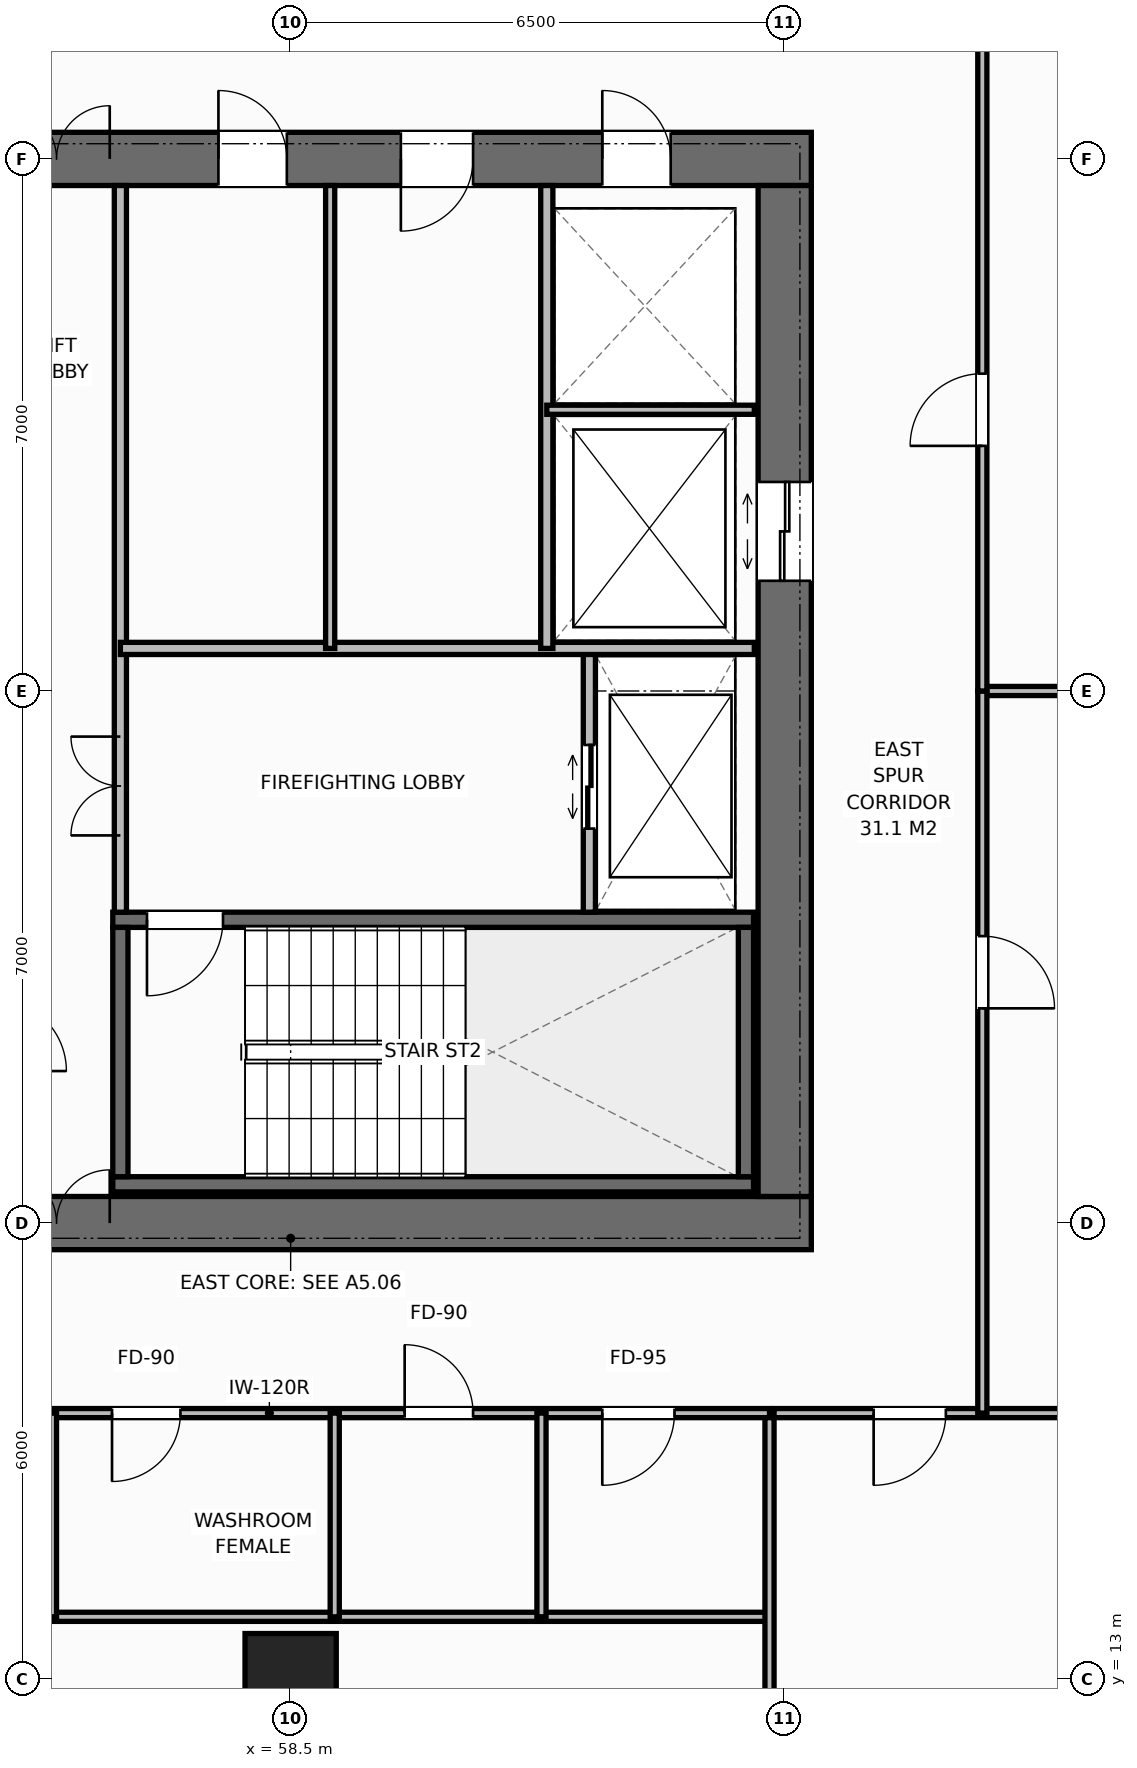
"""IFC4 building model, lengths in metres.
Left out: names, types, materials, properties, quantities, classifications, styles, units other than length and angle.
Written with IfcOpenShell. Run it as: python <this file> out.ifc"""

import sys

from ifc_helpers import new_model, si_unit, direction, frame, frame_2d, origin, origin_2d, place, context, subcontext, project, spatial, rectangle, extrude, element, fill, save


model = new_model("IFC4")
c1 = context("Model", 3, precision=1e-05, world=origin(), true_north=direction((0.0, 1.0)))
c2 = subcontext(c1, "Body", "Model", "MODEL_VIEW")
j1 = project(units=[si_unit("LENGTHUNIT", "METRE"), si_unit("PLANEANGLEUNIT", "RADIAN")], contexts=[c1])
p1 = place(None, origin())
s1 = spatial("IfcSite", under=j1, at=p1, CompositionType="ELEMENT")
p2 = place(p1, origin())
s2 = spatial("IfcBuilding", under=s1, at=p2, CompositionType="ELEMENT")
p3 = place(p2, frame((0.0, 0.0, 101.2)))
s3 = spatial("IfcBuildingStorey", under=s2, at=p3, CompositionType="ELEMENT", Elevation=101.2)
p4 = place(p3, frame((51.65, 19.0, 0.0), z_axis=(0.0, 0.0, 1.0), x_axis=(1.0, 0.0, 0.0)))
e1 = element("IfcWall", 1, at=p4, inside=s3, PredefinedType="SHEAR", context=c2, shape_type="SweptSolid", body=[
    extrude(rectangle(XDim=13.7, YDim=0.7, at=frame_2d((6.85, 0.0))), origin(), (0.0, 0.0, 1.0), 3.8),
])
p5 = place(p4, frame((3.07, 0.0, 0.0)))
e2 = element("IfcOpeningElement", 2, at=p5, cuts=e1, PredefinedType="OPENING", context=c2, shape_type="SweptSolid", body=[
    extrude(rectangle(XDim=1.4, YDim=2.2, at=frame_2d((0.7, 1.1))), frame((0.0, 0.36, 0.0), z_axis=(0.0, -1.0, 0.0), x_axis=(1.0, 0.0, 0.0)), (0.0, 0.0, 1.0), 0.72),
])
p6 = place(p3, frame((51.65, 33.0, 0.0), z_axis=(0.0, 0.0, 1.0), x_axis=(1.0, 0.0, 0.0)))
e3 = element("IfcWall", 3, at=p6, inside=s3, PredefinedType="SHEAR", context=c2, shape_type="SweptSolid", body=[
    extrude(rectangle(XDim=13.7, YDim=0.7, at=frame_2d((6.85, 0.0))), origin(), (0.0, 0.0, 1.0), 3.8),
])
p7 = place(p6, frame((3.07, 0.0, 0.0)))
e4 = element("IfcOpeningElement", 4, at=p7, cuts=e3, PredefinedType="OPENING", context=c2, shape_type="SweptSolid", body=[
    extrude(rectangle(XDim=1.4, YDim=2.2, at=frame_2d((0.7, 1.1))), frame((0.0, 0.36, 0.0), z_axis=(0.0, -1.0, 0.0), x_axis=(1.0, 0.0, 0.0)), (0.0, 0.0, 1.0), 0.72),
])
p8 = place(p6, frame((10.95, 0.0, 0.0)))
e5 = element("IfcOpeningElement", 5, at=p8, cuts=e3, PredefinedType="OPENING", context=c2, shape_type="SweptSolid", body=[
    extrude(rectangle(XDim=0.9, YDim=2.15, at=frame_2d((0.45, 1.075))), frame((0.0, 0.36, 0.0), z_axis=(0.0, -1.0, 0.0), x_axis=(1.0, 0.0, 0.0)), (0.0, 0.0, 1.0), 0.72),
])
p9 = place(p6, frame((5.9, 0.0, 0.0)))
e6 = element("IfcOpeningElement", 6, at=p9, cuts=e3, PredefinedType="OPENING", context=c2, shape_type="SweptSolid", body=[
    extrude(rectangle(XDim=0.9, YDim=2.15, at=frame_2d((0.45, 1.075))), frame((0.0, 0.36, 0.0), z_axis=(0.0, -1.0, 0.0), x_axis=(1.0, 0.0, 0.0)), (0.0, 0.0, 1.0), 0.72),
])
p10 = place(p6, frame((8.3, 0.0, 0.0)))
e7 = element("IfcOpeningElement", 7, at=p10, cuts=e3, PredefinedType="OPENING", context=c2, shape_type="SweptSolid", body=[
    extrude(rectangle(XDim=0.95, YDim=2.15, at=frame_2d((0.475, 1.075))), frame((0.0, 0.36, 0.0), z_axis=(0.0, -1.0, 0.0), x_axis=(1.0, 0.0, 0.0)), (0.0, 0.0, 1.0), 0.72),
])
p11 = place(p3, frame((65.0, 19.35, 0.0), z_axis=(0.0, 0.0, 1.0), x_axis=(0.0, 1.0, 0.0)))
e8 = element("IfcWall", 8, at=p11, inside=s3, PredefinedType="SHEAR", context=c2, shape_type="SweptSolid", body=[
    extrude(rectangle(XDim=13.3, YDim=0.7, at=frame_2d((6.65, 0.0))), origin(), (0.0, 0.0, 1.0), 3.8),
])
p12 = place(p11, frame((8.1, 0.0, 0.0)))
e9 = element("IfcOpeningElement", 9, at=p12, cuts=e8, PredefinedType="OPENING", context=c2, shape_type="SweptSolid", body=[
    extrude(rectangle(XDim=1.3, YDim=2.2, at=frame_2d((0.65, 1.1))), frame((0.0, 0.36, 0.0), z_axis=(0.0, -1.0, 0.0), x_axis=(1.0, 0.0, 0.0)), (0.0, 0.0, 1.0), 0.72),
])
p13 = place(p3, frame((56.16, 19.51, 0.0), z_axis=(0.0, 0.0, 1.0), x_axis=(1.0, 0.0, 0.0)))
e10 = element("IfcWall", 10, at=p13, inside=s3, PredefinedType="SHEAR", context=c2, shape_type="SweptSolid", body=[
    extrude(rectangle(XDim=8.43, YDim=0.2, at=frame_2d((4.215, 0.0))), origin(), (0.0, 0.0, 1.0), 3.8),
])
p14 = place(p3, frame((56.16, 22.99, 0.0), z_axis=(0.0, 0.0, 1.0), x_axis=(1.0, 0.0, 0.0)))
e11 = element("IfcWall", 11, at=p14, inside=s3, PredefinedType="SHEAR", context=c2, shape_type="SweptSolid", body=[
    extrude(rectangle(XDim=8.43, YDim=0.2, at=frame_2d((4.215, 0.0))), origin(), (0.0, 0.0, 1.0), 3.8),
])
p15 = place(p14, frame((0.45, 0.0, 0.0)))
e12 = element("IfcOpeningElement", 12, at=p15, cuts=e11, PredefinedType="OPENING", context=c2, shape_type="SweptSolid", body=[
    extrude(rectangle(XDim=1.0, YDim=2.15, at=frame_2d((0.5, 1.075))), frame((0.0, 0.11, 0.0), z_axis=(0.0, -1.0, 0.0), x_axis=(1.0, 0.0, 0.0)), (0.0, 0.0, 1.0), 0.22),
])
for number, where, z_axis, x_axis in (
    (13, (56.26, 19.61, 0.0), (0.0, 0.0, 1.0), (0.0, 1.0, 0.0)),
    (14, (64.49, 19.61, 0.0), (0.0, 0.0, 1.0), (0.0, 1.0, 0.0)),
):
    element("IfcWall", number, at=place(p3, frame(where, z_axis=z_axis, x_axis=x_axis)), inside=s3, PredefinedType="SHEAR", context=c2, shape_type="SweptSolid", body=[
        extrude(rectangle(XDim=3.28, YDim=0.2, at=frame_2d((1.64, 0.0))), origin(), (0.0, 0.0, 1.0), 3.8),
    ])
p16 = place(p3, frame((58.5, 13.0, 0.0), z_axis=(0.0, 0.0, 1.0), x_axis=(1.0, 0.0, 0.0)))
e15 = element("IfcColumn", 15, at=p16, inside=s3, PredefinedType="COLUMN", context=c2, shape_type="SweptSolid", body=[
    extrude(rectangle(XDim=1.2, YDim=1.2, at=origin_2d()), origin(), (0.0, 0.0, 1.0), 3.8),
])
p17 = place(p3, frame((56.26, 23.09, 0.0), z_axis=(0.0, 0.0, 1.0), x_axis=(0.0, 1.0, 0.0)))
e16 = element("IfcWall", 16, at=p17, inside=s3, PredefinedType="STANDARD", context=c2, shape_type="SweptSolid", body=[
    extrude(rectangle(XDim=9.56, YDim=0.16, at=frame_2d((4.78, 0.0))), origin(), (0.0, 0.0, 1.0), 3.565),
])
p18 = place(p17, frame((1.01, 0.0, 0.0)))
e17 = element("IfcOpeningElement", 17, at=p18, cuts=e16, PredefinedType="OPENING", context=c2, shape_type="SweptSolid", body=[
    extrude(rectangle(XDim=1.3, YDim=2.2, at=frame_2d((0.65, 1.1))), frame((0.0, 0.09, 0.0), z_axis=(0.0, -1.0, 0.0), x_axis=(1.0, 0.0, 0.0)), (0.0, 0.0, 1.0), 0.18),
])
p19 = place(p3, frame((62.43, 23.09, 0.0), z_axis=(0.0, 0.0, 1.0), x_axis=(0.0, 1.0, 0.0)))
e18 = element("IfcWall", 18, at=p19, inside=s3, PredefinedType="STANDARD", context=c2, shape_type="SweptSolid", body=[
    extrude(rectangle(XDim=3.47, YDim=0.16, at=frame_2d((1.735, 0.0))), origin(), (0.0, 0.0, 1.0), 3.565),
])
p20 = place(p19, frame((1.1, 0.0, 0.0)))
e19 = element("IfcOpeningElement", 19, at=p20, cuts=e18, PredefinedType="OPENING", context=c2, shape_type="SweptSolid", body=[
    extrude(rectangle(XDim=1.1, YDim=2.2, at=frame_2d((0.55, 1.1))), frame((0.0, 0.09, 0.0), z_axis=(0.0, -1.0, 0.0), x_axis=(1.0, 0.0, 0.0)), (0.0, 0.0, 1.0), 0.18),
])
p21 = place(p3, frame((56.26, 26.56, 0.0), z_axis=(0.0, 0.0, 1.0), x_axis=(1.0, 0.0, 0.0)))
e20 = element("IfcWall", 20, at=p21, inside=s3, PredefinedType="STANDARD", context=c2, shape_type="SweptSolid", body=[
    extrude(rectangle(XDim=8.34, YDim=0.16, at=frame_2d((4.17, 0.0))), origin(), (0.0, 0.0, 1.0), 3.565),
])
p22 = place(p3, frame((61.87, 26.56, 0.0), z_axis=(0.0, 0.0, 1.0), x_axis=(0.0, 1.0, 0.0)))
e21 = element("IfcWall", 21, at=p22, inside=s3, PredefinedType="STANDARD", context=c2, shape_type="SweptSolid", body=[
    extrude(rectangle(XDim=6.09, YDim=0.16, at=frame_2d((3.045, 0.0))), origin(), (0.0, 0.0, 1.0), 3.565),
])
p23 = place(p3, frame((61.87, 29.7, 0.0), z_axis=(0.0, 0.0, 1.0), x_axis=(1.0, 0.0, 0.0)))
e22 = element("IfcWall", 22, at=p23, inside=s3, PredefinedType="PARTITIONING", context=c2, shape_type="SweptSolid", body=[
    extrude(rectangle(XDim=2.73, YDim=0.12, at=frame_2d((1.365, 0.0))), origin(), (0.0, 0.0, 1.0), 3.565),
])
p24 = place(p3, frame((59.02, 26.56, 0.0), z_axis=(0.0, 0.0, 1.0), x_axis=(0.0, 1.0, 0.0)))
e23 = element("IfcWall", 23, at=p24, inside=s3, PredefinedType="PARTITIONING", context=c2, shape_type="SweptSolid", body=[
    extrude(rectangle(XDim=6.09, YDim=0.12, at=frame_2d((3.045, 0.0))), origin(), (0.0, 0.0, 1.0), 3.565),
])
p25 = place(p3, frame((51.64, 16.5, 0.0), z_axis=(0.0, 0.0, 1.0), x_axis=(1.0, 0.0, 0.0)))
e24 = element("IfcWall", 24, at=p25, inside=s3, PredefinedType="PARTITIONING", context=c2, shape_type="SweptSolid", body=[
    extrude(rectangle(XDim=13.16, YDim=0.12, at=frame_2d((6.58, 0.0))), origin(), (0.0, 0.0, 1.0), 3.565),
])
p26 = place(p25, frame((1.51, 0.0, 0.0)))
e25 = element("IfcOpeningElement", 25, at=p26, cuts=e24, PredefinedType="OPENING", context=c2, shape_type="SweptSolid", body=[
    extrude(rectangle(XDim=0.9, YDim=2.15, at=frame_2d((0.45, 1.075))), frame((0.0, 0.07, 0.0), z_axis=(0.0, -1.0, 0.0), x_axis=(1.0, 0.0, 0.0)), (0.0, 0.0, 1.0), 0.14),
])
p27 = place(p25, frame((4.51, 0.0, 0.0)))
e26 = element("IfcOpeningElement", 26, at=p27, cuts=e24, PredefinedType="OPENING", context=c2, shape_type="SweptSolid", body=[
    extrude(rectangle(XDim=0.9, YDim=2.15, at=frame_2d((0.45, 1.075))), frame((0.0, 0.07, 0.0), z_axis=(0.0, -1.0, 0.0), x_axis=(1.0, 0.0, 0.0)), (0.0, 0.0, 1.0), 0.14),
])
p28 = place(p25, frame((8.36, 0.0, 0.0)))
e27 = element("IfcOpeningElement", 27, at=p28, cuts=e24, PredefinedType="OPENING", context=c2, shape_type="SweptSolid", body=[
    extrude(rectangle(XDim=0.9, YDim=2.15, at=frame_2d((0.45, 1.075))), frame((0.0, 0.07, 0.0), z_axis=(0.0, -1.0, 0.0), x_axis=(1.0, 0.0, 0.0)), (0.0, 0.0, 1.0), 0.14),
])
p29 = place(p25, frame((10.96, 0.0, 0.0)))
e28 = element("IfcOpeningElement", 28, at=p29, cuts=e24, PredefinedType="OPENING", context=c2, shape_type="SweptSolid", body=[
    extrude(rectangle(XDim=0.95, YDim=2.15, at=frame_2d((0.475, 1.075))), frame((0.0, 0.07, 0.0), z_axis=(0.0, -1.0, 0.0), x_axis=(1.0, 0.0, 0.0)), (0.0, 0.0, 1.0), 0.14),
])
p30 = place(p3, frame((51.64, 13.82, 0.0), z_axis=(0.0, 0.0, 1.0), x_axis=(1.0, 0.0, 0.0)))
e29 = element("IfcWall", 29, at=p30, inside=s3, PredefinedType="PARTITIONING", context=c2, shape_type="SweptSolid", body=[
    extrude(rectangle(XDim=13.16, YDim=0.12, at=frame_2d((6.58, 0.0))), origin(), (0.0, 0.0, 1.0), 3.565),
])
for number, where, z_axis, x_axis in (
    (30, (55.36, 13.82, 0.0), (0.0, 0.0, 1.0), (0.0, 1.0, 0.0)),
    (31, (59.08, 13.82, 0.0), (0.0, 0.0, 1.0), (0.0, 1.0, 0.0)),
    (32, (61.8, 13.82, 0.0), (0.0, 0.0, 1.0), (0.0, 1.0, 0.0)),
):
    element("IfcWall", number, at=place(p3, frame(where, z_axis=z_axis, x_axis=x_axis)), inside=s3, PredefinedType="PARTITIONING", context=c2, shape_type="SweptSolid", body=[
        extrude(rectangle(XDim=2.68, YDim=0.12, at=frame_2d((1.34, 0.0))), origin(), (0.0, 0.0, 1.0), 3.565),
    ])
p31 = place(p3, frame((64.8, 1.72, 0.0), z_axis=(0.0, 0.0, 1.0), x_axis=(0.0, 1.0, 0.0)))
e33 = element("IfcWall", 33, at=p31, inside=s3, PredefinedType="PARTITIONING", context=c2, shape_type="SweptSolid", body=[
    extrude(rectangle(XDim=14.72, YDim=0.12, at=frame_2d((7.36, 0.0))), origin(), (0.0, 0.0, 1.0), 2.965),
])
p32 = place(p3, frame((64.86, 16.5, 0.0), z_axis=(0.0, 0.0, 1.0), x_axis=(1.0, 0.0, 0.0)))
e34 = element("IfcWall", 34, at=p32, inside=s3, PredefinedType="PARTITIONING", context=c2, shape_type="SweptSolid", body=[
    extrude(rectangle(XDim=11.16, YDim=0.12, at=frame_2d((5.58, 0.0))), origin(), (0.0, 0.0, 1.0), 3.565),
])
p33 = place(p32, frame((1.31, 0.0, 0.0)))
e35 = element("IfcOpeningElement", 35, at=p33, cuts=e34, PredefinedType="OPENING", context=c2, shape_type="SweptSolid", body=[
    extrude(rectangle(XDim=0.95, YDim=2.15, at=frame_2d((0.475, 1.075))), frame((0.0, 0.07, 0.0), z_axis=(0.0, -1.0, 0.0), x_axis=(1.0, 0.0, 0.0)), (0.0, 0.0, 1.0), 0.14),
])
p34 = place(p3, frame((67.6, 26.0, 0.0), z_axis=(0.0, 0.0, 1.0), x_axis=(1.0, 0.0, 0.0)))
e36 = element("IfcWall", 36, at=p34, inside=s3, PredefinedType="PARTITIONING", context=c2, shape_type="SweptSolid", body=[
    extrude(rectangle(XDim=8.58, YDim=0.12, at=frame_2d((4.29, 0.0))), origin(), (0.0, 0.0, 1.0), 3.565),
])
p35 = place(p3, frame((67.6, 16.5, 0.0), z_axis=(0.0, 0.0, 1.0), x_axis=(0.0, 1.0, 0.0)))
e37 = element("IfcWall", 37, at=p35, inside=s3, PredefinedType="PARTITIONING", context=c2, shape_type="SweptSolid", body=[
    extrude(rectangle(XDim=9.5, YDim=0.12, at=frame_2d((4.75, 0.0))), origin(), (0.0, 0.0, 1.0), 3.565),
])
p36 = place(p35, frame((5.325, 0.0, 0.0)))
e38 = element("IfcOpeningElement", 38, at=p36, cuts=e37, PredefinedType="OPENING", context=c2, shape_type="SweptSolid", body=[
    extrude(rectangle(XDim=0.95, YDim=2.15, at=frame_2d((0.475, 1.075))), frame((0.0, 0.07, 0.0), z_axis=(0.0, -1.0, 0.0), x_axis=(1.0, 0.0, 0.0)), (0.0, 0.0, 1.0), 0.14),
])
p37 = place(p3, frame((67.6, 26.0, 0.0), z_axis=(0.0, 0.0, 1.0), x_axis=(0.0, 1.0, 0.0)))
e39 = element("IfcWall", 39, at=p37, inside=s3, PredefinedType="PARTITIONING", context=c2, shape_type="SweptSolid", body=[
    extrude(rectangle(XDim=9.5, YDim=0.12, at=frame_2d((4.75, 0.0))), origin(), (0.0, 0.0, 1.0), 3.565),
])
p38 = place(p37, frame((3.225, 0.0, 0.0)))
e40 = element("IfcOpeningElement", 40, at=p38, cuts=e39, PredefinedType="OPENING", context=c2, shape_type="SweptSolid", body=[
    extrude(rectangle(XDim=0.95, YDim=2.15, at=frame_2d((0.475, 1.075))), frame((0.0, 0.07, 0.0), z_axis=(0.0, -1.0, 0.0), x_axis=(1.0, 0.0, 0.0)), (0.0, 0.0, 1.0), 0.14),
])
p39 = place(p5, origin())
e41 = element("IfcDoor", 41, at=p39, inside=s3, OperationType="DOUBLE_DOOR_SINGLE_SWING", PredefinedType="DOOR", context=c2, shape_type="SweptSolid", body=[
    extrude(rectangle(XDim=1.4, YDim=2.2, at=frame_2d((0.7, 1.1))), frame((0.0, 0.125, 0.0), z_axis=(0.0, -1.0, 0.0), x_axis=(1.0, 0.0, 0.0)), (0.0, 0.0, 1.0), 0.05),
])
fill(e2, e41)
p40 = place(p7, origin())
e42 = element("IfcDoor", 42, at=p40, inside=s3, OperationType="DOUBLE_DOOR_SINGLE_SWING", PredefinedType="DOOR", context=c2, shape_type="SweptSolid", body=[
    extrude(rectangle(XDim=1.4, YDim=2.2, at=frame_2d((0.7, 1.1))), frame((0.0, -0.075, 0.0), z_axis=(0.0, -1.0, 0.0), x_axis=(1.0, 0.0, 0.0)), (0.0, 0.0, 1.0), 0.05),
])
fill(e4, e42)
p41 = place(p15, origin())
e43 = element("IfcDoor", 43, at=p41, inside=s3, OperationType="SINGLE_SWING_RIGHT", PredefinedType="DOOR", context=c2, shape_type="SweptSolid", body=[
    extrude(rectangle(XDim=1.0, YDim=2.15, at=frame_2d((0.5, 1.075))), frame((0.0, 0.025, 0.0), z_axis=(0.0, -1.0, 0.0), x_axis=(1.0, 0.0, 0.0)), (0.0, 0.0, 1.0), 0.05),
])
fill(e12, e43)
p42 = place(p20, origin())
e44 = element("IfcDoor", 44, at=p42, inside=s3, OperationType="DOUBLE_DOOR_SLIDING", PredefinedType="DOOR", context=c2, shape_type="SweptSolid", body=[
    extrude(rectangle(XDim=1.1, YDim=2.2, at=frame_2d((0.55, 1.1))), frame((0.0, 0.025, 0.0), z_axis=(0.0, -1.0, 0.0), x_axis=(1.0, 0.0, 0.0)), (0.0, 0.0, 1.0), 0.05),
])
fill(e19, e44)
p43 = place(p18, origin())
e45 = element("IfcDoor", 45, at=p43, inside=s3, OperationType="DOUBLE_DOOR_SINGLE_SWING", PredefinedType="DOOR", context=c2, shape_type="SweptSolid", body=[
    extrude(rectangle(XDim=1.3, YDim=2.2, at=frame_2d((0.65, 1.1))), frame((0.0, 0.025, 0.0), z_axis=(0.0, -1.0, 0.0), x_axis=(1.0, 0.0, 0.0)), (0.0, 0.0, 1.0), 0.05),
])
fill(e17, e45)
p44 = place(p12, origin())
e46 = element("IfcDoor", 46, at=p44, inside=s3, OperationType="DOUBLE_DOOR_SLIDING", PredefinedType="DOOR", context=c2, shape_type="SweptSolid", body=[
    extrude(rectangle(XDim=1.3, YDim=2.2, at=frame_2d((0.65, 1.1))), frame((0.0, 0.025, 0.0), z_axis=(0.0, -1.0, 0.0), x_axis=(1.0, 0.0, 0.0)), (0.0, 0.0, 1.0), 0.05),
])
fill(e9, e46)
p45 = place(p8, origin())
e47 = element("IfcDoor", 47, at=p45, inside=s3, OperationType="SINGLE_SWING_LEFT", PredefinedType="DOOR", context=c2, shape_type="SweptSolid", body=[
    extrude(rectangle(XDim=0.9, YDim=2.15, at=frame_2d((0.45, 1.075))), frame((0.0, -0.075, 0.0), z_axis=(0.0, -1.0, 0.0), x_axis=(1.0, 0.0, 0.0)), (0.0, 0.0, 1.0), 0.05),
])
fill(e5, e47)
p46 = place(p9, origin())
e48 = element("IfcDoor", 48, at=p46, inside=s3, OperationType="SINGLE_SWING_LEFT", PredefinedType="DOOR", context=c2, shape_type="SweptSolid", body=[
    extrude(rectangle(XDim=0.9, YDim=2.15, at=frame_2d((0.45, 1.075))), frame((0.0, -0.075, 0.0), z_axis=(0.0, -1.0, 0.0), x_axis=(1.0, 0.0, 0.0)), (0.0, 0.0, 1.0), 0.05),
])
fill(e6, e48)
p47 = place(p10, origin())
e49 = element("IfcDoor", 49, at=p47, inside=s3, OperationType="SINGLE_SWING_RIGHT", PredefinedType="DOOR", context=c2, shape_type="SweptSolid", body=[
    extrude(rectangle(XDim=0.95, YDim=2.15, at=frame_2d((0.475, 1.075))), frame((0.0, -0.075, 0.0), z_axis=(0.0, -1.0, 0.0), x_axis=(1.0, 0.0, 0.0)), (0.0, 0.0, 1.0), 0.05),
])
fill(e7, e49)
p48 = place(p27, origin())
e50 = element("IfcDoor", 50, at=p48, inside=s3, OperationType="SINGLE_SWING_RIGHT", PredefinedType="DOOR", context=c2, shape_type="SweptSolid", body=[
    extrude(rectangle(XDim=0.9, YDim=2.15, at=frame_2d((0.45, 1.075))), frame((0.0, 0.025, 0.0), z_axis=(0.0, -1.0, 0.0), x_axis=(1.0, 0.0, 0.0)), (0.0, 0.0, 1.0), 0.05),
])
fill(e26, e50)
p49 = place(p28, origin())
e51 = element("IfcDoor", 51, at=p49, inside=s3, OperationType="SINGLE_SWING_LEFT", PredefinedType="DOOR", context=c2, shape_type="SweptSolid", body=[
    extrude(rectangle(XDim=0.9, YDim=2.15, at=frame_2d((0.45, 1.075))), frame((0.0, 0.025, 0.0), z_axis=(0.0, -1.0, 0.0), x_axis=(1.0, 0.0, 0.0)), (0.0, 0.0, 1.0), 0.05),
])
fill(e27, e51)
p50 = place(p29, origin())
e52 = element("IfcDoor", 52, at=p50, inside=s3, OperationType="SINGLE_SWING_RIGHT", PredefinedType="DOOR", context=c2, shape_type="SweptSolid", body=[
    extrude(rectangle(XDim=0.95, YDim=2.15, at=frame_2d((0.475, 1.075))), frame((0.0, 0.025, 0.0), z_axis=(0.0, -1.0, 0.0), x_axis=(1.0, 0.0, 0.0)), (0.0, 0.0, 1.0), 0.05),
])
fill(e28, e52)
p51 = place(p33, origin())
e53 = element("IfcDoor", 53, at=p51, inside=s3, OperationType="SINGLE_SWING_RIGHT", PredefinedType="DOOR", context=c2, shape_type="SweptSolid", body=[
    extrude(rectangle(XDim=0.95, YDim=2.15, at=frame_2d((0.475, 1.075))), frame((0.0, 0.025, 0.0), z_axis=(0.0, -1.0, 0.0), x_axis=(1.0, 0.0, 0.0)), (0.0, 0.0, 1.0), 0.05),
])
fill(e35, e53)
p52 = place(p36, origin())
e54 = element("IfcDoor", 54, at=p52, inside=s3, OperationType="SINGLE_SWING_RIGHT", PredefinedType="DOOR", context=c2, shape_type="SweptSolid", body=[
    extrude(rectangle(XDim=0.95, YDim=2.15, at=frame_2d((0.475, 1.075))), frame((0.0, 0.025, 0.0), z_axis=(0.0, -1.0, 0.0), x_axis=(1.0, 0.0, 0.0)), (0.0, 0.0, 1.0), 0.05),
])
fill(e38, e54)
p53 = place(p38, origin())
e55 = element("IfcDoor", 55, at=p53, inside=s3, OperationType="SINGLE_SWING_LEFT", PredefinedType="DOOR", context=c2, shape_type="SweptSolid", body=[
    extrude(rectangle(XDim=0.95, YDim=2.15, at=frame_2d((0.475, 1.075))), frame((0.0, 0.025, 0.0), z_axis=(0.0, -1.0, 0.0), x_axis=(1.0, 0.0, 0.0)), (0.0, 0.0, 1.0), 0.05),
])
fill(e40, e55)
save(model, sys.argv[1])
